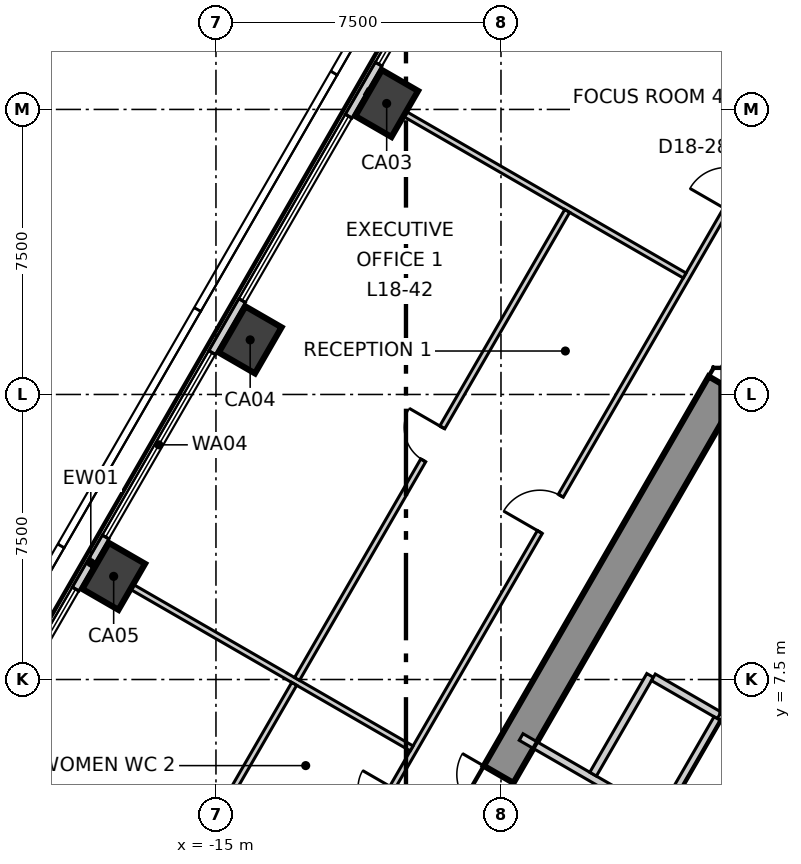
"""IFC4 building model, lengths in metres.
Left out: names, types, materials, properties, quantities, classifications, styles, units other than length and angle.
Written with IfcOpenShell. Run it as: python <this file> out.ifc"""

import sys

from ifc_helpers import new_model, si_unit, direction, frame, frame_2d, origin, origin_2d, place, context, subcontext, project, spatial, polyline, rectangle, outline, extrude, element, fill, save


model = new_model("IFC4")
c1 = context("Model", 3, precision=1e-05, world=origin(), true_north=direction((0.0, 1.0)))
c2 = subcontext(c1, "Body", "Model", "MODEL_VIEW")
j1 = project(units=[si_unit("LENGTHUNIT", "METRE"), si_unit("PLANEANGLEUNIT", "RADIAN")], contexts=[c1])
p1 = place(None, origin())
s1 = spatial("IfcSite", under=j1, at=p1, CompositionType="ELEMENT")
p2 = place(p1, origin())
s2 = spatial("IfcBuilding", under=s1, at=p2, CompositionType="ELEMENT")
p3 = place(p2, frame((0.0, 0.0, 83.3)))
s3 = spatial("IfcBuildingStorey", under=s2, at=p3, CompositionType="ELEMENT", Elevation=83.3)
p4 = place(p3, frame((1.645, 15.25, -0.3), z_axis=(0.0, 0.0, 1.0), x_axis=(-1.0, 0.0, 0.0)))
e1 = element("IfcWall", 1, at=p4, inside=s3, PredefinedType="SHEAR", context=c2, shape_type="SweptSolid", body=[
    extrude(outline(polyline([(-0.26, -0.45), (1.645, -0.45), (3.55, -0.45), (3.031, 0.45), (1.645, 0.45), (0.259, 0.45), (-0.26, -0.45)])), origin(), (0.0, 0.0, 1.0), 4.0),
])
p5 = place(p4, frame((0.945, 0.0, 0.3)))
e2 = element("IfcOpeningElement", 2, at=p5, cuts=e1, PredefinedType="OPENING", context=c2, shape_type="SweptSolid", body=[
    extrude(rectangle(XDim=1.4, YDim=2.1, at=frame_2d((0.7, 1.05))), frame((0.0, 0.46, 0.0), z_axis=(0.0, -1.0, 0.0), x_axis=(1.0, 0.0, 0.0)), (0.0, 0.0, 1.0), 0.92),
])
p6 = place(p3, frame((-1.645, 15.25, -0.3), z_axis=(0.0, 0.0, 1.0), x_axis=(-0.500026485275, -0.866010111964, 0.0)))
e3 = element("IfcWall", 3, at=p6, inside=s3, PredefinedType="SHEAR", context=c2, shape_type="SweptSolid", body=[
    extrude(outline(polyline([(-0.26, -0.45), (1.685, -0.45), (3.63, -0.45), (5.576, -0.45), (7.521, -0.45), (9.466, -0.449), (11.411, -0.449), (13.357, -0.449), (15.302, -0.449), (17.247, -0.449), (19.192, -0.449), (21.138, -0.449), (23.083, -0.449), (25.028, -0.449), (24.509, 0.45), (22.644, 0.45), (20.778, 0.45), (18.913, 0.45), (17.048, 0.45), (15.182, 0.449), (13.317, 0.449), (11.452, 0.449), (9.587, 0.449), (7.721, 0.449), (5.856, 0.449), (3.991, 0.449), (2.125, 0.449), (0.26, 0.449), (-0.26, -0.45)])), origin(), (0.0, 0.0, 1.0), 4.0),
])
p7 = place(p6, frame((11.834, 0.0, 0.3)))
e4 = element("IfcOpeningElement", 4, at=p7, cuts=e3, PredefinedType="OPENING", context=c2, shape_type="SweptSolid", body=[
    extrude(rectangle(XDim=1.1, YDim=2.1, at=frame_2d((0.55, 1.05))), frame((0.0, 0.46, 0.0), z_axis=(0.0, -1.0, 0.0), x_axis=(1.0, 0.0, 0.0)), (0.0, 0.0, 1.0), 0.92),
])
p8 = place(p6, frame((18.976, 0.0, 0.3)))
e5 = element("IfcOpeningElement", 5, at=p8, cuts=e3, PredefinedType="OPENING", context=c2, shape_type="SweptSolid", body=[
    extrude(rectangle(XDim=0.9, YDim=2.1, at=frame_2d((0.45, 1.05))), frame((0.0, 0.46, 0.0), z_axis=(0.0, -1.0, 0.0), x_axis=(1.0, 0.0, 0.0)), (0.0, 0.0, 1.0), 0.92),
])
for number, where, z_axis, x_axis in (
    (6, (-10.508, 22.657, -0.3), (0.0, 0.0, 1.0), (0.5, 0.866, 0.0)),
    (7, (-14.1, 16.436, -0.3), (0.0, 0.0, 1.0), (0.5, 0.866, 0.0)),
    (8, (-17.692, 10.214, -0.3), (0.0, 0.0, 1.0), (0.5, 0.866, 0.0)),
):
    element("IfcColumn", number, at=place(p3, frame(where, z_axis=z_axis, x_axis=x_axis)), inside=s3, PredefinedType="COLUMN", context=c2, shape_type="SweptSolid", body=[
        extrude(rectangle(XDim=1.4, YDim=1.1, at=origin_2d()), origin(), (0.0, 0.0, 1.0), 4.0),
    ])
p9 = place(p3, frame((-3.28, 36.577, 0.0), z_axis=(0.0, 0.0, 1.0), x_axis=(-0.500001635065, -0.866024459777, 0.0)))
e9 = element("IfcWall", 9, at=p9, inside=s3, PredefinedType="ELEMENTEDWALL", context=c2, shape_type="SweptSolid", body=[
    extrude(rectangle(XDim=60.053, YDim=0.2, at=frame_2d((30.027, 0.0))), origin(), (0.0, 0.0, 1.0), 3.7),
])
p10 = place(p9, frame((2.094, 0.0, 0.9)))
e10 = element("IfcOpeningElement", 10, at=p10, cuts=e9, PredefinedType="OPENING", context=c2, shape_type="SweptSolid", body=[
    extrude(rectangle(XDim=5.6, YDim=2.5, at=frame_2d((2.8, 1.25))), frame((0.0, 0.11, 0.0), z_axis=(0.0, -1.0, 0.0), x_axis=(1.0, 0.0, 0.0)), (0.0, 0.0, 1.0), 0.22),
])
p11 = place(p9, frame((9.278, 0.0, 0.9)))
e11 = element("IfcOpeningElement", 11, at=p11, cuts=e9, PredefinedType="OPENING", context=c2, shape_type="SweptSolid", body=[
    extrude(rectangle(XDim=5.6, YDim=2.5, at=frame_2d((2.8, 1.25))), frame((0.0, 0.11, 0.0), z_axis=(0.0, -1.0, 0.0), x_axis=(1.0, 0.0, 0.0)), (0.0, 0.0, 1.0), 0.22),
])
p12 = place(p9, frame((16.461, 0.0, 0.9)))
e12 = element("IfcOpeningElement", 12, at=p12, cuts=e9, PredefinedType="OPENING", context=c2, shape_type="SweptSolid", body=[
    extrude(rectangle(XDim=5.6, YDim=2.5, at=frame_2d((2.8, 1.25))), frame((0.0, 0.11, 0.0), z_axis=(0.0, -1.0, 0.0), x_axis=(1.0, 0.0, 0.0)), (0.0, 0.0, 1.0), 0.22),
])
p13 = place(p9, frame((23.645, 0.0, 0.9)))
e13 = element("IfcOpeningElement", 13, at=p13, cuts=e9, PredefinedType="OPENING", context=c2, shape_type="SweptSolid", body=[
    extrude(rectangle(XDim=5.6, YDim=2.5, at=frame_2d((2.8, 1.25))), frame((0.0, 0.11, 0.0), z_axis=(0.0, -1.0, 0.0), x_axis=(1.0, 0.0, 0.0)), (0.0, 0.0, 1.0), 0.22),
])
p14 = place(p9, frame((30.828, 0.0, 0.9)))
e14 = element("IfcOpeningElement", 14, at=p14, cuts=e9, PredefinedType="OPENING", context=c2, shape_type="SweptSolid", body=[
    extrude(rectangle(XDim=5.6, YDim=2.5, at=frame_2d((2.8, 1.25))), frame((0.0, 0.11, 0.0), z_axis=(0.0, -1.0, 0.0), x_axis=(1.0, 0.0, 0.0)), (0.0, 0.0, 1.0), 0.22),
])
p15 = place(p9, frame((38.012, 0.0, 0.9)))
e15 = element("IfcOpeningElement", 15, at=p15, cuts=e9, PredefinedType="OPENING", context=c2, shape_type="SweptSolid", body=[
    extrude(rectangle(XDim=5.6, YDim=2.5, at=frame_2d((2.8, 1.25))), frame((0.0, 0.11, 0.0), z_axis=(0.0, -1.0, 0.0), x_axis=(1.0, 0.0, 0.0)), (0.0, 0.0, 1.0), 0.22),
])
p16 = place(p9, frame((45.195, 0.0, 0.9)))
e16 = element("IfcOpeningElement", 16, at=p16, cuts=e9, PredefinedType="OPENING", context=c2, shape_type="SweptSolid", body=[
    extrude(rectangle(XDim=5.6, YDim=2.5, at=frame_2d((2.8, 1.25))), frame((0.0, 0.11, 0.0), z_axis=(0.0, -1.0, 0.0), x_axis=(1.0, 0.0, 0.0)), (0.0, 0.0, 1.0), 0.22),
])
p17 = place(p9, frame((52.379, 0.0, 0.9)))
e17 = element("IfcOpeningElement", 17, at=p17, cuts=e9, PredefinedType="OPENING", context=c2, shape_type="SweptSolid", body=[
    extrude(rectangle(XDim=5.6, YDim=2.5, at=frame_2d((2.8, 1.25))), frame((0.0, 0.11, 0.0), z_axis=(0.0, -1.0, 0.0), x_axis=(1.0, 0.0, 0.0)), (0.0, 0.0, 1.0), 0.22),
])
p18 = place(p3, frame((-19.497, -11.17, 0.0), z_axis=(0.0, 0.0, 1.0), x_axis=(0.499998854553, 0.866026065108, 0.0)))
e18 = element("IfcWall", 18, at=p18, inside=s3, PredefinedType="PARTITIONING", context=c2, shape_type="SweptSolid", body=[
    extrude(rectangle(XDim=38.994, YDim=0.15, at=frame_2d((19.497, 0.0))), origin(), (0.0, 0.0, 1.0), 3.7),
])
p19 = place(p18, frame((35.844, 0.0, 0.0)))
e19 = element("IfcOpeningElement", 19, at=p19, cuts=e18, PredefinedType="OPENING", context=c2, shape_type="SweptSolid", body=[
    extrude(rectangle(XDim=1.1, YDim=2.1, at=frame_2d((0.55, 1.05))), frame((0.0, 0.085, 0.0), z_axis=(0.0, -1.0, 0.0), x_axis=(1.0, 0.0, 0.0)), (0.0, 0.0, 1.0), 0.17),
])
p20 = place(p18, frame((26.04, 0.0, 0.0)))
e20 = element("IfcOpeningElement", 20, at=p20, cuts=e18, PredefinedType="OPENING", context=c2, shape_type="SweptSolid", body=[
    extrude(rectangle(XDim=1.1, YDim=2.1, at=frame_2d((0.55, 1.05))), frame((0.0, 0.085, 0.0), z_axis=(0.0, -1.0, 0.0), x_axis=(1.0, 0.0, 0.0)), (0.0, 0.0, 1.0), 0.17),
])
p21 = place(p18, frame((7.272, 0.0, 0.0)))
e21 = element("IfcOpeningElement", 21, at=p21, cuts=e18, PredefinedType="OPENING", context=c2, shape_type="SweptSolid", body=[
    extrude(rectangle(XDim=1.1, YDim=2.1, at=frame_2d((0.55, 1.05))), frame((0.0, 0.085, 0.0), z_axis=(0.0, -1.0, 0.0), x_axis=(1.0, 0.0, 0.0)), (0.0, 0.0, 1.0), 0.17),
])
p22 = place(p18, frame((17.372, 0.0, 0.0)))
e22 = element("IfcOpeningElement", 22, at=p22, cuts=e18, PredefinedType="OPENING", context=c2, shape_type="SweptSolid", body=[
    extrude(rectangle(XDim=0.9, YDim=2.1, at=frame_2d((0.45, 1.05))), frame((0.0, 0.085, 0.0), z_axis=(0.0, -1.0, 0.0), x_axis=(1.0, 0.0, 0.0)), (0.0, 0.0, 1.0), 0.17),
])
p23 = place(p18, frame((14.172, 0.0, 0.0)))
e23 = element("IfcOpeningElement", 23, at=p23, cuts=e18, PredefinedType="OPENING", context=c2, shape_type="SweptSolid", body=[
    extrude(rectangle(XDim=0.9, YDim=2.1, at=frame_2d((0.45, 1.05))), frame((0.0, 0.085, 0.0), z_axis=(0.0, -1.0, 0.0), x_axis=(1.0, 0.0, 0.0)), (0.0, 0.0, 1.0), 0.17),
])
p24 = place(p18, frame((11.272, 0.0, 0.0)))
e24 = element("IfcOpeningElement", 24, at=p24, cuts=e18, PredefinedType="OPENING", context=c2, shape_type="SweptSolid", body=[
    extrude(rectangle(XDim=1.0, YDim=2.1, at=frame_2d((0.5, 1.05))), frame((0.0, 0.085, 0.0), z_axis=(0.0, -1.0, 0.0), x_axis=(1.0, 0.0, 0.0)), (0.0, 0.0, 1.0), 0.17),
])
p25 = place(p18, frame((1.904, 0.0, 0.0)))
e25 = element("IfcOpeningElement", 25, at=p25, cuts=e18, PredefinedType="OPENING", context=c2, shape_type="SweptSolid", body=[
    extrude(rectangle(XDim=1.1, YDim=2.1, at=frame_2d((0.55, 1.05))), frame((0.0, 0.085, 0.0), z_axis=(0.0, -1.0, 0.0), x_axis=(1.0, 0.0, 0.0)), (0.0, 0.0, 1.0), 0.17),
])
p26 = place(p3, frame((-18.229, 10.524, 0.0), z_axis=(0.0, 0.0, 1.0), x_axis=(0.866029248602, -0.499993340521, 0.0)))
e26 = element("IfcWall", 26, at=p26, inside=s3, PredefinedType="PARTITIONING", context=c2, shape_type="SweptSolid", body=[
    extrude(rectangle(XDim=9.674, YDim=0.15, at=frame_2d((4.837, 0.0))), origin(), (0.0, 0.0, 1.0), 3.2),
])
p27 = place(p3, frame((-17.304, -0.171, 0.0), z_axis=(0.0, 0.0, 1.0), x_axis=(0.500054279689, 0.865994063124, 0.0)))
e27 = element("IfcWall", 27, at=p27, inside=s3, PredefinedType="PARTITIONING", context=c2, shape_type="SweptSolid", body=[
    extrude(rectangle(XDim=8.725, YDim=0.15, at=frame_2d((4.363, 0.0))), origin(), (0.0, 0.0, 1.0), 3.7),
])
p28 = place(p3, frame((-11.045, 22.967, 0.0), z_axis=(0.0, 0.0, 1.0), x_axis=(0.866018320735, -0.500012268001, 0.0)))
e28 = element("IfcWall", 28, at=p28, inside=s3, PredefinedType="PARTITIONING", context=c2, shape_type="SweptSolid", body=[
    extrude(rectangle(XDim=9.674, YDim=0.15, at=frame_2d((4.837, 0.0))), origin(), (0.0, 0.0, 1.0), 3.7),
])
p29 = place(p3, frame((-12.866, 7.515, 0.0), z_axis=(0.0, 0.0, 1.0), x_axis=(0.499947407797, 0.866055765778, 0.0)))
e29 = element("IfcWall", 29, at=p29, inside=s3, PredefinedType="PARTITIONING", context=c2, shape_type="SweptSolid", body=[
    extrude(rectangle(XDim=14.217, YDim=0.15, at=frame_2d((7.109, 0.0))), origin(), (0.0, 0.0, 1.0), 3.7),
])
p30 = place(p29, frame((6.642, 0.0, 0.0)))
e30 = element("IfcOpeningElement", 30, at=p30, cuts=e29, PredefinedType="OPENING", context=c2, shape_type="SweptSolid", body=[
    extrude(rectangle(XDim=1.0, YDim=2.1, at=frame_2d((0.5, 1.05))), frame((0.0, 0.085, 0.0), z_axis=(0.0, -1.0, 0.0), x_axis=(1.0, 0.0, 0.0)), (0.0, 0.0, 1.0), 0.17),
])
p31 = place(p3, frame((-6.97, 5.987, 0.0), z_axis=(0.0, 0.0, 1.0), x_axis=(0.866029956157, -0.499992114976, 0.0)))
e31 = element("IfcWall", 31, at=p31, inside=s3, PredefinedType="SOLIDWALL", context=c2, shape_type="SweptSolid", body=[
    extrude(rectangle(XDim=4.232, YDim=0.2, at=frame_2d((2.116, 0.0))), origin(), (0.0, 0.0, 1.0), 3.7),
])
p32 = place(p31, frame((2.73, 0.0, 0.0)))
e32 = element("IfcOpeningElement", 32, at=p32, cuts=e31, PredefinedType="OPENING", context=c2, shape_type="SweptSolid", body=[
    extrude(rectangle(XDim=0.9, YDim=2.1, at=frame_2d((0.45, 1.05))), frame((0.0, 0.11, 0.0), z_axis=(0.0, -1.0, 0.0), x_axis=(1.0, 0.0, 0.0)), (0.0, 0.0, 1.0), 0.22),
])
p33 = place(p3, frame((-5.076, 5.009, 0.0), z_axis=(0.0, 0.0, 1.0), x_axis=(0.50002537861, 0.866010750942, 0.0)))
e33 = element("IfcWall", 33, at=p33, inside=s3, PredefinedType="SOLIDWALL", context=c2, shape_type="SweptSolid", body=[
    extrude(rectangle(XDim=3.0, YDim=0.2, at=frame_2d((1.5, 0.0))), origin(), (0.0, 0.0, 1.0), 3.7),
])
p34 = place(p3, frame((-3.489, 7.557, 0.0), z_axis=(0.0, 0.0, 1.0), x_axis=(0.866010750942, -0.50002537861, 0.0)))
e34 = element("IfcWall", 34, at=p34, inside=s3, PredefinedType="SOLIDWALL", context=c2, shape_type="SweptSolid", body=[
    extrude(rectangle(XDim=2.0, YDim=0.2, at=frame_2d((1.0, 0.0))), origin(), (0.0, 0.0, 1.0), 3.7),
])
p35 = place(p3, frame((-3.257, 3.959, 0.0), z_axis=(0.0, 0.0, 1.0), x_axis=(0.50012328804, 0.865954211699, 0.0)))
e35 = element("IfcWall", 35, at=p35, inside=s3, PredefinedType="SOLIDWALL", context=c2, shape_type="SweptSolid", body=[
    extrude(rectangle(XDim=2.9, YDim=0.2, at=frame_2d((1.45, 0.0))), origin(), (0.0, 0.0, 1.0), 3.7),
])
p36 = place(p3, frame((-1.67, 6.507, 0.0), z_axis=(0.0, 0.0, 1.0), x_axis=(0.865941441609, -0.500145398563, 0.0)))
e36 = element("IfcWall", 36, at=p36, inside=s3, PredefinedType="SOLIDWALL", context=c2, shape_type="SweptSolid", body=[
    extrude(rectangle(XDim=1.815, YDim=0.2, at=frame_2d((0.908, 0.0))), origin(), (0.0, 0.0, 1.0), 3.7),
])
p37 = place(p11, origin())
e37 = element("IfcWindow", 37, at=p37, inside=s3, PartitioningType="SINGLE_PANEL", PredefinedType="WINDOW", context=c2, shape_type="SweptSolid", body=[
    extrude(rectangle(XDim=5.6, YDim=2.5, at=frame_2d((2.8, 1.25))), frame((0.0, 0.03, 0.0), z_axis=(0.0, -1.0, 0.0), x_axis=(1.0, 0.0, 0.0)), (0.0, 0.0, 1.0), 0.06),
])
fill(e11, e37)
p38 = place(p12, origin())
e38 = element("IfcWindow", 38, at=p38, inside=s3, PartitioningType="SINGLE_PANEL", PredefinedType="WINDOW", context=c2, shape_type="SweptSolid", body=[
    extrude(rectangle(XDim=5.6, YDim=2.5, at=frame_2d((2.8, 1.25))), frame((0.0, 0.03, 0.0), z_axis=(0.0, -1.0, 0.0), x_axis=(1.0, 0.0, 0.0)), (0.0, 0.0, 1.0), 0.06),
])
fill(e12, e38)
p39 = place(p13, origin())
e39 = element("IfcWindow", 39, at=p39, inside=s3, PartitioningType="SINGLE_PANEL", PredefinedType="WINDOW", context=c2, shape_type="SweptSolid", body=[
    extrude(rectangle(XDim=5.6, YDim=2.5, at=frame_2d((2.8, 1.25))), frame((0.0, 0.03, 0.0), z_axis=(0.0, -1.0, 0.0), x_axis=(1.0, 0.0, 0.0)), (0.0, 0.0, 1.0), 0.06),
])
fill(e13, e39)
p40 = place(p14, origin())
e40 = element("IfcWindow", 40, at=p40, inside=s3, PartitioningType="SINGLE_PANEL", PredefinedType="WINDOW", context=c2, shape_type="SweptSolid", body=[
    extrude(rectangle(XDim=5.6, YDim=2.5, at=frame_2d((2.8, 1.25))), frame((0.0, 0.03, 0.0), z_axis=(0.0, -1.0, 0.0), x_axis=(1.0, 0.0, 0.0)), (0.0, 0.0, 1.0), 0.06),
])
fill(e14, e40)
p41 = place(p20, origin())
e41 = element("IfcDoor", 41, at=p41, inside=s3, OperationType="SINGLE_SWING_RIGHT", PredefinedType="DOOR", context=c2, shape_type="SweptSolid", body=[
    extrude(rectangle(XDim=1.1, YDim=2.1, at=frame_2d((0.55, 1.05))), frame((0.0, 0.025, 0.0), z_axis=(0.0, -1.0, 0.0), x_axis=(1.0, 0.0, 0.0)), (0.0, 0.0, 1.0), 0.05),
])
fill(e20, e41)
p42 = place(p30, origin())
e42 = element("IfcDoor", 42, at=p42, inside=s3, OperationType="SINGLE_SWING_LEFT", PredefinedType="DOOR", context=c2, shape_type="SweptSolid", body=[
    extrude(rectangle(XDim=1.0, YDim=2.1, at=frame_2d((0.5, 1.05))), frame((0.0, 0.025, 0.0), z_axis=(0.0, -1.0, 0.0), x_axis=(1.0, 0.0, 0.0)), (0.0, 0.0, 1.0), 0.05),
])
fill(e30, e42)
p43 = place(p7, origin())
e43 = element("IfcDoor", 43, at=p43, inside=s3, OperationType="SINGLE_SWING_LEFT", PredefinedType="DOOR", context=c2, shape_type="SweptSolid", body=[
    extrude(rectangle(XDim=1.1, YDim=2.1, at=frame_2d((0.55, 1.05))), frame((0.0, 0.025, 0.0), z_axis=(0.0, -1.0, 0.0), x_axis=(1.0, 0.0, 0.0)), (0.0, 0.0, 1.0), 0.05),
])
fill(e4, e43)
save(model, sys.argv[1])
